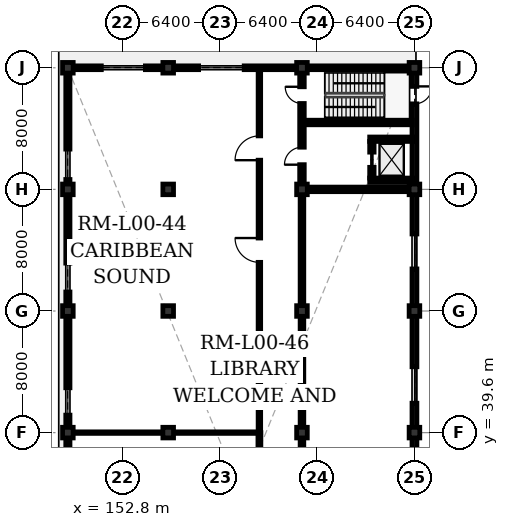
"""IFC4 building model, lengths in metres.
Left out: names, types, materials, properties, quantities, classifications, styles, units other than length and angle.
Written with IfcOpenShell. Run it as: python <this file> out.ifc"""

import sys

from ifc_helpers import new_model, si_unit, direction, frame, frame_2d, origin, origin_2d, place, context, subcontext, project, spatial, rectangle, extrude, element, fill, save


model = new_model("IFC4")
c1 = context("Model", 3, precision=1e-05, world=origin(), true_north=direction((0.0, 1.0)))
c2 = subcontext(c1, "Body", "Model", "MODEL_VIEW")
j1 = project(units=[si_unit("LENGTHUNIT", "METRE"), si_unit("PLANEANGLEUNIT", "RADIAN")], contexts=[c1])
p1 = place(None, origin())
s1 = spatial("IfcSite", under=j1, at=p1, CompositionType="ELEMENT")
p2 = place(p1, origin())
s2 = spatial("IfcBuilding", under=s1, at=p2, CompositionType="ELEMENT")
p3 = place(p2, origin())
s3 = spatial("IfcBuildingStorey", under=s2, at=p3, CompositionType="ELEMENT", Elevation=0.0)
for number, where, z_axis, x_axis in (
    (1, (149.2, 39.6, 0.0), (0.0, 0.0, 1.0), (1.0, 0.0, 0.0)),
    (2, (149.2, 47.6, 0.0), (0.0, 0.0, 1.0), (1.0, 0.0, 0.0)),
    (3, (149.2, 55.6, 0.0), (0.0, 0.0, 1.0), (1.0, 0.0, 0.0)),
    (4, (149.2, 63.6, 0.0), (0.0, 0.0, 1.0), (1.0, 0.0, 0.0)),
    (5, (155.8, 39.6, 0.0), (0.0, 0.0, 1.0), (1.0, 0.0, 0.0)),
    (6, (155.8, 47.6, 0.0), (0.0, 0.0, 1.0), (1.0, 0.0, 0.0)),
    (7, (155.8, 55.6, 0.0), (0.0, 0.0, 1.0), (1.0, 0.0, 0.0)),
    (8, (155.8, 63.6, 0.0), (0.0, 0.0, 1.0), (1.0, 0.0, 0.0)),
    (9, (164.6, 39.6, 0.0), (0.0, 0.0, 1.0), (1.0, 0.0, 0.0)),
    (10, (164.6, 47.6, 0.0), (0.0, 0.0, 1.0), (1.0, 0.0, 0.0)),
    (11, (164.6, 55.6, 0.0), (0.0, 0.0, 1.0), (1.0, 0.0, 0.0)),
    (12, (164.6, 63.6, 0.0), (0.0, 0.0, 1.0), (1.0, 0.0, 0.0)),
    (13, (172.0, 39.6, 0.0), (0.0, 0.0, 1.0), (1.0, 0.0, 0.0)),
    (14, (172.0, 47.6, 0.0), (0.0, 0.0, 1.0), (1.0, 0.0, 0.0)),
    (15, (172.0, 55.6, 0.0), (0.0, 0.0, 1.0), (1.0, 0.0, 0.0)),
    (16, (172.0, 63.6, 0.0), (0.0, 0.0, 1.0), (1.0, 0.0, 0.0)),
):
    element("IfcColumn", number, at=place(p3, frame(where, z_axis=z_axis, x_axis=x_axis)), inside=s3, PredefinedType="COLUMN", context=c2, shape_type="SweptSolid", body=[
        extrude(rectangle(XDim=0.7, YDim=0.7, at=origin_2d()), origin(), (0.0, 0.0, 1.0), 5.4),
    ])
p4 = place(p3, frame((149.2, 15.6, 0.0), z_axis=(0.0, 0.0, 1.0), x_axis=(0.0, 1.0, 0.0)))
e17 = element("IfcWall", 17, at=p4, inside=s3, PredefinedType="SOLIDWALL", context=c2, shape_type="SweptSolid", body=[
    extrude(rectangle(XDim=48.0, YDim=0.275, at=frame_2d((24.0, 0.0))), origin(), (0.0, 0.0, 1.0), 4.29),
])
p5 = place(p4, frame((11.4, 0.0, 0.0)))
e18 = element("IfcOpeningElement", 18, at=p5, cuts=e17, PredefinedType="OPENING", context=c2, shape_type="SweptSolid", body=[
    extrude(rectangle(XDim=2.0, YDim=2.5, at=frame_2d((1.0, 1.25))), frame((0.0, 0.147, 0.0), z_axis=(0.0, -1.0, 0.0), x_axis=(1.0, 0.0, 0.0)), (0.0, 0.0, 1.0), 0.295),
])
p6 = place(p4, frame((2.2, 0.0, 0.8)))
e19 = element("IfcOpeningElement", 19, at=p6, cuts=e17, PredefinedType="OPENING", context=c2, shape_type="SweptSolid", body=[
    extrude(rectangle(XDim=1.5, YDim=2.1, at=frame_2d((0.75, 1.05))), frame((0.0, 0.147, 0.0), z_axis=(0.0, -1.0, 0.0), x_axis=(1.0, 0.0, 0.0)), (0.0, 0.0, 1.0), 0.295),
])
p7 = place(p4, frame((8.85, 0.0, 0.8)))
e20 = element("IfcOpeningElement", 20, at=p7, cuts=e17, PredefinedType="OPENING", context=c2, shape_type="SweptSolid", body=[
    extrude(rectangle(XDim=1.6, YDim=2.1, at=frame_2d((0.8, 1.05))), frame((0.0, 0.147, 0.0), z_axis=(0.0, -1.0, 0.0), x_axis=(1.0, 0.0, 0.0)), (0.0, 0.0, 1.0), 0.295),
])
p8 = place(p4, frame((17.0, 0.0, 0.8)))
e21 = element("IfcOpeningElement", 21, at=p8, cuts=e17, PredefinedType="OPENING", context=c2, shape_type="SweptSolid", body=[
    extrude(rectangle(XDim=1.7, YDim=2.15, at=frame_2d((0.85, 1.075))), frame((0.0, 0.147, 0.0), z_axis=(0.0, -1.0, 0.0), x_axis=(1.0, 0.0, 0.0)), (0.0, 0.0, 1.0), 0.295),
])
p9 = place(p4, frame((25.15, 0.0, 0.8)))
e22 = element("IfcOpeningElement", 22, at=p9, cuts=e17, PredefinedType="OPENING", context=c2, shape_type="SweptSolid", body=[
    extrude(rectangle(XDim=1.8, YDim=2.15, at=frame_2d((0.9, 1.075))), frame((0.0, 0.147, 0.0), z_axis=(0.0, -1.0, 0.0), x_axis=(1.0, 0.0, 0.0)), (0.0, 0.0, 1.0), 0.295),
])
p10 = place(p4, frame((33.25, 0.0, 0.8)))
e23 = element("IfcOpeningElement", 23, at=p10, cuts=e17, PredefinedType="OPENING", context=c2, shape_type="SweptSolid", body=[
    extrude(rectangle(XDim=1.9, YDim=2.2, at=frame_2d((0.95, 1.1))), frame((0.0, 0.147, 0.0), z_axis=(0.0, -1.0, 0.0), x_axis=(1.0, 0.0, 0.0)), (0.0, 0.0, 1.0), 0.295),
])
p11 = place(p4, frame((40.65, 0.0, 0.8)))
e24 = element("IfcOpeningElement", 24, at=p11, cuts=e17, PredefinedType="OPENING", context=c2, shape_type="SweptSolid", body=[
    extrude(rectangle(XDim=2.0, YDim=2.2, at=frame_2d((1.0, 1.1))), frame((0.0, 0.147, 0.0), z_axis=(0.0, -1.0, 0.0), x_axis=(1.0, 0.0, 0.0)), (0.0, 0.0, 1.0), 0.295),
])
p12 = place(p3, frame((149.2, 63.6, 0.0), z_axis=(0.0, 0.0, 1.0), x_axis=(1.0, 0.0, 0.0)))
e25 = element("IfcWall", 25, at=p12, inside=s3, PredefinedType="SOLIDWALL", context=c2, shape_type="SweptSolid", body=[
    extrude(rectangle(XDim=22.8, YDim=0.25, at=frame_2d((11.4, 0.0))), origin(), (0.0, 0.0, 1.0), 4.29),
])
p13 = place(p12, frame((2.2, 0.0, 0.9)))
e26 = element("IfcOpeningElement", 26, at=p13, cuts=e25, PredefinedType="OPENING", context=c2, shape_type="SweptSolid", body=[
    extrude(rectangle(XDim=2.9, YDim=2.4, at=frame_2d((1.45, 1.2))), frame((0.0, 0.135, 0.0), z_axis=(0.0, -1.0, 0.0), x_axis=(1.0, 0.0, 0.0)), (0.0, 0.0, 1.0), 0.27),
])
p14 = place(p12, frame((8.6, 0.0, 0.9)))
e27 = element("IfcOpeningElement", 27, at=p14, cuts=e25, PredefinedType="OPENING", context=c2, shape_type="SweptSolid", body=[
    extrude(rectangle(XDim=3.0, YDim=2.45, at=frame_2d((1.5, 1.225))), frame((0.0, 0.135, 0.0), z_axis=(0.0, -1.0, 0.0), x_axis=(1.0, 0.0, 0.0)), (0.0, 0.0, 1.0), 0.27),
])
p15 = place(p3, frame((172.0, 63.6, 0.0), z_axis=(0.0, 0.0, 1.0), x_axis=(0.0, -1.0, 0.0)))
e28 = element("IfcWall", 28, at=p15, inside=s3, PredefinedType="SOLIDWALL", context=c2, shape_type="SweptSolid", body=[
    extrude(rectangle(XDim=56.0, YDim=0.32, at=frame_2d((28.0, 0.0))), origin(), (0.0, 0.0, 1.0), 4.29),
])
p16 = place(p15, frame((1.225, 0.0, 0.0)))
e29 = element("IfcOpeningElement", 29, at=p16, cuts=e28, PredefinedType="OPENING", context=c2, shape_type="SweptSolid", body=[
    extrude(rectangle(XDim=1.15, YDim=2.2, at=frame_2d((0.575, 1.1))), frame((0.0, 0.17, 0.0), z_axis=(0.0, -1.0, 0.0), x_axis=(1.0, 0.0, 0.0)), (0.0, 0.0, 1.0), 0.34),
])
p17 = place(p15, frame((52.9, 0.0, 0.0)))
e30 = element("IfcOpeningElement", 30, at=p17, cuts=e28, PredefinedType="OPENING", context=c2, shape_type="SweptSolid", body=[
    extrude(rectangle(XDim=2.0, YDim=2.5, at=frame_2d((1.0, 1.25))), frame((0.0, 0.17, 0.0), z_axis=(0.0, -1.0, 0.0), x_axis=(1.0, 0.0, 0.0)), (0.0, 0.0, 1.0), 0.34),
])
p18 = place(p15, frame((10.933, 0.0, 0.8)))
e31 = element("IfcOpeningElement", 31, at=p18, cuts=e28, PredefinedType="OPENING", context=c2, shape_type="SweptSolid", body=[
    extrude(rectangle(XDim=2.3, YDim=2.25, at=frame_2d((1.15, 1.125))), frame((0.0, 0.17, 0.0), z_axis=(0.0, -1.0, 0.0), x_axis=(1.0, 0.0, 0.0)), (0.0, 0.0, 1.0), 0.34),
])
p19 = place(p15, frame((19.667, 0.0, 0.8)))
e32 = element("IfcOpeningElement", 32, at=p19, cuts=e28, PredefinedType="OPENING", context=c2, shape_type="SweptSolid", body=[
    extrude(rectangle(XDim=2.4, YDim=2.3, at=frame_2d((1.2, 1.15))), frame((0.0, 0.17, 0.0), z_axis=(0.0, -1.0, 0.0), x_axis=(1.0, 0.0, 0.0)), (0.0, 0.0, 1.0), 0.34),
])
p20 = place(p15, frame((28.4, 0.0, 0.8)))
e33 = element("IfcOpeningElement", 33, at=p20, cuts=e28, PredefinedType="OPENING", context=c2, shape_type="SweptSolid", body=[
    extrude(rectangle(XDim=2.5, YDim=2.3, at=frame_2d((1.25, 1.15))), frame((0.0, 0.17, 0.0), z_axis=(0.0, -1.0, 0.0), x_axis=(1.0, 0.0, 0.0)), (0.0, 0.0, 1.0), 0.34),
])
p21 = place(p15, frame((37.133, 0.0, 0.8)))
e34 = element("IfcOpeningElement", 34, at=p21, cuts=e28, PredefinedType="OPENING", context=c2, shape_type="SweptSolid", body=[
    extrude(rectangle(XDim=1.6, YDim=2.75, at=frame_2d((0.8, 1.375))), frame((0.0, 0.17, 0.0), z_axis=(0.0, -1.0, 0.0), x_axis=(1.0, 0.0, 0.0)), (0.0, 0.0, 1.0), 0.34),
])
p22 = place(p15, frame((45.117, 0.0, 0.8)))
e35 = element("IfcOpeningElement", 35, at=p22, cuts=e28, PredefinedType="OPENING", context=c2, shape_type="SweptSolid", body=[
    extrude(rectangle(XDim=1.85, YDim=2.75, at=frame_2d((0.925, 1.375))), frame((0.0, 0.17, 0.0), z_axis=(0.0, -1.0, 0.0), x_axis=(1.0, 0.0, 0.0)), (0.0, 0.0, 1.0), 0.34),
])
p23 = place(p3, frame((164.952, 55.6, 0.0), z_axis=(0.0, 0.0, 1.0), x_axis=(1.0, 0.0, 0.0)))
e36 = element("IfcWall", 36, at=p23, inside=s3, PredefinedType="SHEAR", context=c2, shape_type="SweptSolid", body=[
    extrude(rectangle(XDim=6.696, YDim=0.3, at=frame_2d((3.348, 0.0))), origin(), (0.0, 0.0, 1.0), 5.14),
])
p24 = place(p3, frame((164.6, 55.952, 0.0), z_axis=(0.0, 0.0, 1.0), x_axis=(0.0, 1.0, 0.0)))
e37 = element("IfcWall", 37, at=p24, inside=s3, PredefinedType="SHEAR", context=c2, shape_type="SweptSolid", body=[
    extrude(rectangle(XDim=7.296, YDim=0.3, at=frame_2d((3.648, 0.0))), origin(), (0.0, 0.0, 1.0), 5.14),
])
p25 = place(p24, frame((5.298, 0.0, 0.0)))
e38 = element("IfcOpeningElement", 38, at=p25, cuts=e37, PredefinedType="OPENING", context=c2, shape_type="SweptSolid", body=[
    extrude(rectangle(XDim=1.1, YDim=2.15, at=frame_2d((0.55, 1.075))), frame((0.0, 0.16, 0.0), z_axis=(0.0, -1.0, 0.0), x_axis=(1.0, 0.0, 0.0)), (0.0, 0.0, 1.0), 0.32),
])
p26 = place(p24, frame((1.273, 0.0, 0.0)))
e39 = element("IfcOpeningElement", 39, at=p26, cuts=e37, PredefinedType="OPENING", context=c2, shape_type="SweptSolid", body=[
    extrude(rectangle(XDim=1.15, YDim=2.2, at=frame_2d((0.575, 1.1))), frame((0.0, 0.16, 0.0), z_axis=(0.0, -1.0, 0.0), x_axis=(1.0, 0.0, 0.0)), (0.0, 0.0, 1.0), 0.32),
])
p27 = place(p3, frame((164.75, 60.0, 0.0), z_axis=(0.0, 0.0, 1.0), x_axis=(1.0, 0.0, 0.0)))
e40 = element("IfcWall", 40, at=p27, inside=s3, PredefinedType="SHEAR", context=c2, shape_type="SweptSolid", body=[
    extrude(rectangle(XDim=7.1, YDim=0.3, at=frame_2d((3.55, 0.0))), origin(), (0.0, 0.0, 1.0), 5.14),
])
for number, where, z_axis, x_axis in (
    (41, (169.055, 56.2, 0.0), (0.0, 0.0, 1.0), (1.0, 0.0, 0.0)),
    (42, (169.055, 58.9, 0.0), (0.0, 0.0, 1.0), (1.0, 0.0, 0.0)),
):
    element("IfcWall", number, at=place(p3, frame(where, z_axis=z_axis, x_axis=x_axis)), inside=s3, PredefinedType="SHEAR", context=c2, shape_type="SweptSolid", body=[
        extrude(rectangle(XDim=2.89, YDim=0.29, at=frame_2d((1.445, 0.0))), origin(), (0.0, 0.0, 1.0), 5.14),
    ])
p28 = place(p3, frame((169.2, 56.345, 0.0), z_axis=(0.0, 0.0, 1.0), x_axis=(0.0, 1.0, 0.0)))
e43 = element("IfcWall", 43, at=p28, inside=s3, PredefinedType="SHEAR", context=c2, shape_type="SweptSolid", body=[
    extrude(rectangle(XDim=2.41, YDim=0.29, at=frame_2d((1.205, 0.0))), origin(), (0.0, 0.0, 1.0), 5.14),
])
p29 = place(p28, frame((0.705, 0.0, 0.0)))
e44 = element("IfcOpeningElement", 44, at=p29, cuts=e43, PredefinedType="OPENING", context=c2, shape_type="SweptSolid", body=[
    extrude(rectangle(XDim=1.0, YDim=2.15, at=frame_2d((0.5, 1.075))), frame((0.0, 0.155, 0.0), z_axis=(0.0, -1.0, 0.0), x_axis=(1.0, 0.0, 0.0)), (0.0, 0.0, 1.0), 0.31),
])
p30 = place(p3, frame((161.8, 7.6, 0.0), z_axis=(0.0, 0.0, 1.0), x_axis=(0.0, 1.0, 0.0)))
e45 = element("IfcWall", 45, at=p30, inside=s3, PredefinedType="PARTITIONING", context=c2, shape_type="SweptSolid", body=[
    extrude(rectangle(XDim=32.0, YDim=0.19, at=frame_2d((16.0, 0.0))), origin(), (0.0, 0.0, 1.0), 5.14),
])
p31 = place(p30, frame((15.225, 0.0, 0.0)))
e46 = element("IfcOpeningElement", 46, at=p31, cuts=e45, PredefinedType="OPENING", context=c2, shape_type="SweptSolid", body=[
    extrude(rectangle(XDim=1.55, YDim=2.25, at=frame_2d((0.775, 1.125))), frame((0.0, 0.105, 0.0), z_axis=(0.0, -1.0, 0.0), x_axis=(1.0, 0.0, 0.0)), (0.0, 0.0, 1.0), 0.21),
])
p32 = place(p30, frame((24.26, 0.0, 0.0)))
e47 = element("IfcOpeningElement", 47, at=p32, cuts=e45, PredefinedType="OPENING", context=c2, shape_type="SweptSolid", body=[
    extrude(rectangle(XDim=1.4, YDim=2.25, at=frame_2d((0.7, 1.125))), frame((0.0, 0.105, 0.0), z_axis=(0.0, -1.0, 0.0), x_axis=(1.0, 0.0, 0.0)), (0.0, 0.0, 1.0), 0.21),
])
p33 = place(p3, frame((161.8, 39.6, 0.0), z_axis=(0.0, 0.0, 1.0), x_axis=(0.0, 1.0, 0.0)))
e48 = element("IfcWall", 48, at=p33, inside=s3, PredefinedType="PARTITIONING", context=c2, shape_type="SweptSolid", body=[
    extrude(rectangle(XDim=24.0, YDim=0.165, at=frame_2d((12.0, 0.0))), origin(), (0.0, 0.0, 1.0), 5.14),
])
p34 = place(p33, frame((11.2, 0.0, 0.0)))
e49 = element("IfcOpeningElement", 49, at=p34, cuts=e48, PredefinedType="OPENING", context=c2, shape_type="SweptSolid", body=[
    extrude(rectangle(XDim=1.6, YDim=2.3, at=frame_2d((0.8, 1.15))), frame((0.0, 0.093, 0.0), z_axis=(0.0, -1.0, 0.0), x_axis=(1.0, 0.0, 0.0)), (0.0, 0.0, 1.0), 0.185),
])
p35 = place(p33, frame((17.92, 0.0, 0.0)))
e50 = element("IfcOpeningElement", 50, at=p35, cuts=e48, PredefinedType="OPENING", context=c2, shape_type="SweptSolid", body=[
    extrude(rectangle(XDim=1.6, YDim=2.3, at=frame_2d((0.8, 1.15))), frame((0.0, 0.093, 0.0), z_axis=(0.0, -1.0, 0.0), x_axis=(1.0, 0.0, 0.0)), (0.0, 0.0, 1.0), 0.185),
])
p36 = place(p3, frame((164.6, 55.248, 0.0), z_axis=(0.0, 0.0, 1.0), x_axis=(0.0, -1.0, 0.0)))
e51 = element("IfcWall", 51, at=p36, inside=s3, PredefinedType="PARTITIONING", context=c2, shape_type="SweptSolid", body=[
    extrude(rectangle(XDim=44.648, YDim=0.24, at=frame_2d((22.324, 0.0))), origin(), (0.0, 0.0, 1.0), 4.29),
])
p37 = place(p36, frame((21.849, 0.0, 0.0)))
e52 = element("IfcOpeningElement", 52, at=p37, cuts=e51, PredefinedType="OPENING", context=c2, shape_type="SweptSolid", body=[
    extrude(rectangle(XDim=0.95, YDim=2.1, at=frame_2d((0.475, 1.05))), frame((0.0, 0.13, 0.0), z_axis=(0.0, -1.0, 0.0), x_axis=(1.0, 0.0, 0.0)), (0.0, 0.0, 1.0), 0.26),
])
p38 = place(p36, frame((34.125, 0.0, 0.0)))
e53 = element("IfcOpeningElement", 53, at=p38, cuts=e51, PredefinedType="OPENING", context=c2, shape_type="SweptSolid", body=[
    extrude(rectangle(XDim=1.4, YDim=2.25, at=frame_2d((0.7, 1.125))), frame((0.0, 0.13, 0.0), z_axis=(0.0, -1.0, 0.0), x_axis=(1.0, 0.0, 0.0)), (0.0, 0.0, 1.0), 0.26),
])
p39 = place(p3, frame((149.552, 39.6, 0.0), z_axis=(0.0, 0.0, 1.0), x_axis=(1.0, 0.0, 0.0)))
e54 = element("IfcWall", 54, at=p39, inside=s3, PredefinedType="PARTITIONING", context=c2, shape_type="SweptSolid", body=[
    extrude(rectangle(XDim=12.248, YDim=0.1, at=frame_2d((6.124, 0.0))), origin(), (0.0, 0.0, 1.0), 4.29),
])
p40 = place(p16, origin())
e55 = element("IfcDoor", 55, at=p40, inside=s3, OperationType="SINGLE_SWING_LEFT", PredefinedType="DOOR", context=c2, shape_type="SweptSolid", body=[
    extrude(rectangle(XDim=1.15, YDim=2.2, at=frame_2d((0.575, 1.1))), frame((0.0, 0.025, 0.0), z_axis=(0.0, -1.0, 0.0), x_axis=(1.0, 0.0, 0.0)), (0.0, 0.0, 1.0), 0.05),
])
fill(e29, e55)
p41 = place(p9, origin())
e56 = element("IfcWindow", 56, at=p41, inside=s3, PartitioningType="SINGLE_PANEL", PredefinedType="WINDOW", context=c2, shape_type="SweptSolid", body=[
    extrude(rectangle(XDim=1.8, YDim=2.15, at=frame_2d((0.9, 1.075))), frame((0.0, 0.03, 0.0), z_axis=(0.0, -1.0, 0.0), x_axis=(1.0, 0.0, 0.0)), (0.0, 0.0, 1.0), 0.06),
])
fill(e22, e56)
p42 = place(p10, origin())
e57 = element("IfcWindow", 57, at=p42, inside=s3, PartitioningType="SINGLE_PANEL", PredefinedType="WINDOW", context=c2, shape_type="SweptSolid", body=[
    extrude(rectangle(XDim=1.9, YDim=2.2, at=frame_2d((0.95, 1.1))), frame((0.0, 0.03, 0.0), z_axis=(0.0, -1.0, 0.0), x_axis=(1.0, 0.0, 0.0)), (0.0, 0.0, 1.0), 0.06),
])
fill(e23, e57)
p43 = place(p11, origin())
e58 = element("IfcWindow", 58, at=p43, inside=s3, PartitioningType="SINGLE_PANEL", PredefinedType="WINDOW", context=c2, shape_type="SweptSolid", body=[
    extrude(rectangle(XDim=2.0, YDim=2.2, at=frame_2d((1.0, 1.1))), frame((0.0, 0.03, 0.0), z_axis=(0.0, -1.0, 0.0), x_axis=(1.0, 0.0, 0.0)), (0.0, 0.0, 1.0), 0.06),
])
fill(e24, e58)
p44 = place(p13, origin())
e59 = element("IfcWindow", 59, at=p44, inside=s3, PartitioningType="SINGLE_PANEL", PredefinedType="WINDOW", context=c2, shape_type="SweptSolid", body=[
    extrude(rectangle(XDim=2.9, YDim=2.4, at=frame_2d((1.45, 1.2))), frame((0.0, 0.03, 0.0), z_axis=(0.0, -1.0, 0.0), x_axis=(1.0, 0.0, 0.0)), (0.0, 0.0, 1.0), 0.06),
])
fill(e26, e59)
p45 = place(p14, origin())
e60 = element("IfcWindow", 60, at=p45, inside=s3, PartitioningType="SINGLE_PANEL", PredefinedType="WINDOW", context=c2, shape_type="SweptSolid", body=[
    extrude(rectangle(XDim=3.0, YDim=2.45, at=frame_2d((1.5, 1.225))), frame((0.0, 0.03, 0.0), z_axis=(0.0, -1.0, 0.0), x_axis=(1.0, 0.0, 0.0)), (0.0, 0.0, 1.0), 0.06),
])
fill(e27, e60)
p46 = place(p18, origin())
e61 = element("IfcWindow", 61, at=p46, inside=s3, PartitioningType="SINGLE_PANEL", PredefinedType="WINDOW", context=c2, shape_type="SweptSolid", body=[
    extrude(rectangle(XDim=2.3, YDim=2.25, at=frame_2d((1.15, 1.125))), frame((0.0, 0.03, 0.0), z_axis=(0.0, -1.0, 0.0), x_axis=(1.0, 0.0, 0.0)), (0.0, 0.0, 1.0), 0.06),
])
fill(e31, e61)
p47 = place(p19, origin())
e62 = element("IfcWindow", 62, at=p47, inside=s3, PartitioningType="SINGLE_PANEL", PredefinedType="WINDOW", context=c2, shape_type="SweptSolid", body=[
    extrude(rectangle(XDim=2.4, YDim=2.3, at=frame_2d((1.2, 1.15))), frame((0.0, 0.03, 0.0), z_axis=(0.0, -1.0, 0.0), x_axis=(1.0, 0.0, 0.0)), (0.0, 0.0, 1.0), 0.06),
])
fill(e32, e62)
p48 = place(p25, origin())
e63 = element("IfcDoor", 63, at=p48, inside=s3, OperationType="SINGLE_SWING_RIGHT", PredefinedType="DOOR", context=c2, shape_type="SweptSolid", body=[
    extrude(rectangle(XDim=1.1, YDim=2.15, at=frame_2d((0.55, 1.075))), frame((0.0, 0.025, 0.0), z_axis=(0.0, -1.0, 0.0), x_axis=(1.0, 0.0, 0.0)), (0.0, 0.0, 1.0), 0.05),
])
fill(e38, e63)
p49 = place(p26, origin())
e64 = element("IfcDoor", 64, at=p49, inside=s3, OperationType="SINGLE_SWING_LEFT", PredefinedType="DOOR", context=c2, shape_type="SweptSolid", body=[
    extrude(rectangle(XDim=1.15, YDim=2.2, at=frame_2d((0.575, 1.1))), frame((0.0, 0.025, 0.0), z_axis=(0.0, -1.0, 0.0), x_axis=(1.0, 0.0, 0.0)), (0.0, 0.0, 1.0), 0.05),
])
fill(e39, e64)
p50 = place(p29, origin())
e65 = element("IfcDoor", 65, at=p50, inside=s3, OperationType="SLIDING_TO_LEFT", PredefinedType="DOOR", context=c2, shape_type="SweptSolid", body=[
    extrude(rectangle(XDim=1.0, YDim=2.15, at=frame_2d((0.5, 1.075))), frame((0.0, 0.025, 0.0), z_axis=(0.0, -1.0, 0.0), x_axis=(1.0, 0.0, 0.0)), (0.0, 0.0, 1.0), 0.05),
])
fill(e44, e65)
p51 = place(p34, origin())
e66 = element("IfcDoor", 66, at=p51, inside=s3, OperationType="SINGLE_SWING_RIGHT", PredefinedType="DOOR", context=c2, shape_type="SweptSolid", body=[
    extrude(rectangle(XDim=1.6, YDim=2.3, at=frame_2d((0.8, 1.15))), frame((0.0, 0.025, 0.0), z_axis=(0.0, -1.0, 0.0), x_axis=(1.0, 0.0, 0.0)), (0.0, 0.0, 1.0), 0.05),
])
fill(e49, e66)
p52 = place(p35, origin())
e67 = element("IfcDoor", 67, at=p52, inside=s3, OperationType="SINGLE_SWING_LEFT", PredefinedType="DOOR", context=c2, shape_type="SweptSolid", body=[
    extrude(rectangle(XDim=1.6, YDim=2.3, at=frame_2d((0.8, 1.15))), frame((0.0, 0.025, 0.0), z_axis=(0.0, -1.0, 0.0), x_axis=(1.0, 0.0, 0.0)), (0.0, 0.0, 1.0), 0.05),
])
fill(e50, e67)
save(model, sys.argv[1])
